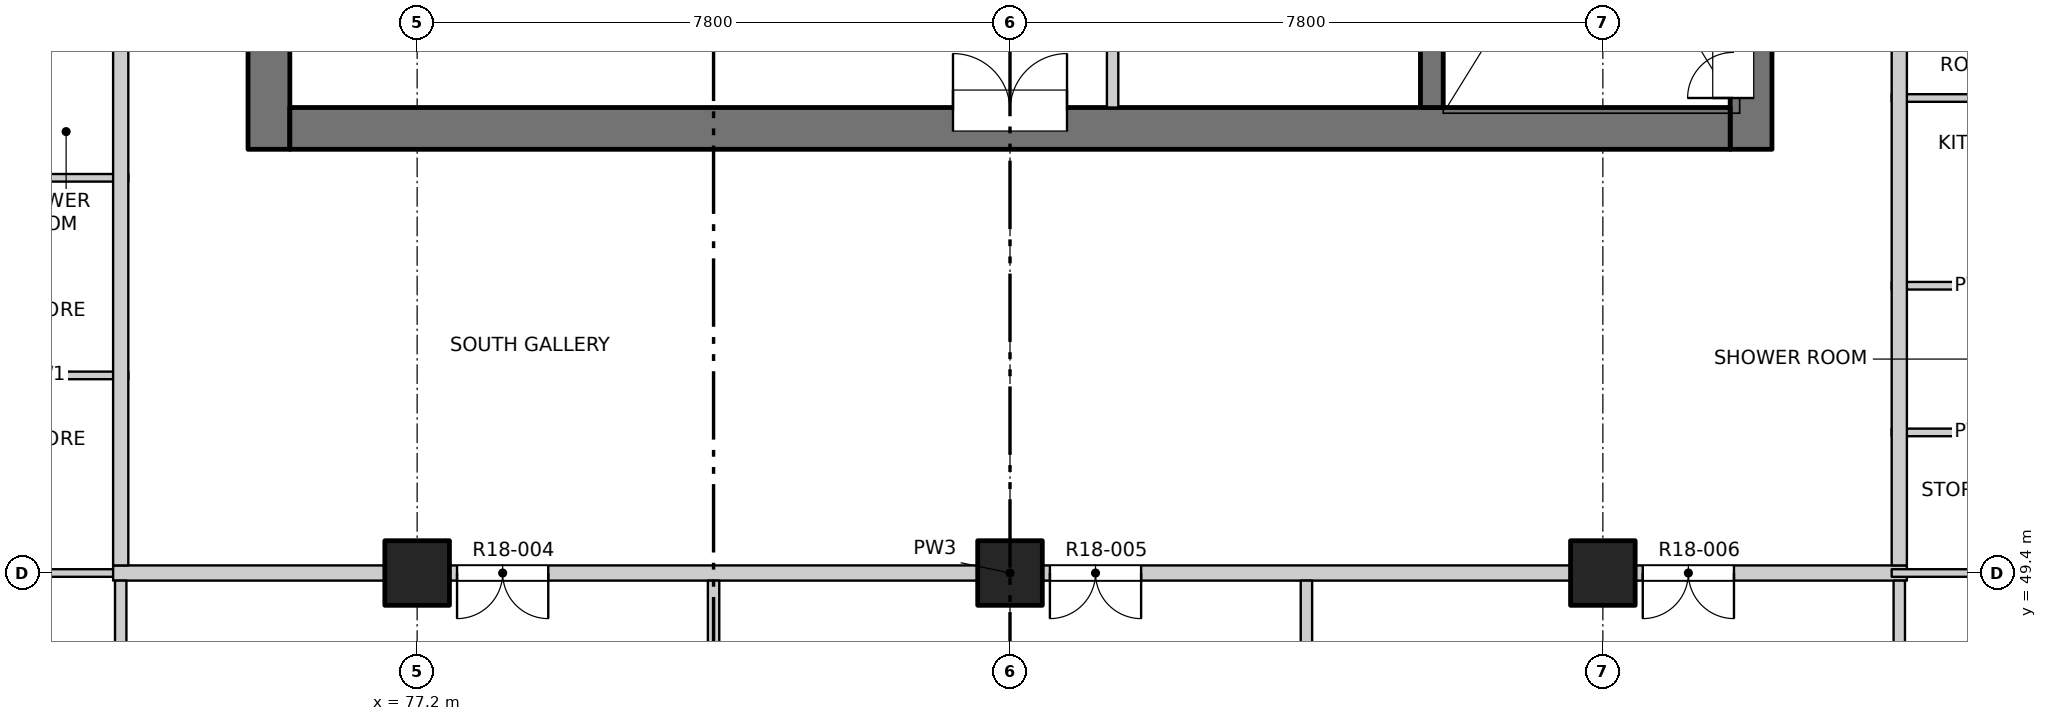
"""IFC4 building model, lengths in metres.
Left out: names, types, materials, properties, quantities, classifications, styles, units other than length and angle.
Written with IfcOpenShell. Run it as: python <this file> out.ifc"""

import sys

from ifc_helpers import new_model, si_unit, direction, frame, frame_2d, origin, origin_2d, place, context, subcontext, project, spatial, rectangle, extrude, element, fill, save


model = new_model("IFC4")
c1 = context("Model", 3, precision=1e-05, world=origin(), true_north=direction((0.0, 1.0)))
c2 = subcontext(c1, "Body", "Model", "MODEL_VIEW")
j1 = project(units=[si_unit("LENGTHUNIT", "METRE"), si_unit("PLANEANGLEUNIT", "RADIAN")], contexts=[c1])
p1 = place(None, origin())
s1 = spatial("IfcSite", under=j1, at=p1, CompositionType="ELEMENT")
p2 = place(p1, origin())
s2 = spatial("IfcBuilding", under=s1, at=p2, CompositionType="ELEMENT")
p3 = place(p2, frame((0.0, 0.0, 189.4)))
s3 = spatial("IfcBuildingStorey", under=s2, at=p3, CompositionType="ELEMENT", Elevation=189.4)
for number, where, z_axis, x_axis in (
    (1, (77.2, 49.4, -0.25), (0.0, 0.0, 1.0), (1.0, 0.0, 0.0)),
    (2, (85.0, 49.4, -0.25), (0.0, 0.0, 1.0), (1.0, 0.0, 0.0)),
    (3, (92.8, 49.4, -0.25), (0.0, 0.0, 1.0), (1.0, 0.0, 0.0)),
):
    element("IfcColumn", number, at=place(p3, frame(where, z_axis=z_axis, x_axis=x_axis)), inside=s3, PredefinedType="COLUMN", context=c2, shape_type="SweptSolid", body=[
        extrude(rectangle(XDim=0.85, YDim=0.85, at=origin_2d()), origin(), (0.0, 0.0, 1.0), 3.35),
    ])
p4 = place(p3, frame((75.25, 54.975, -0.25), z_axis=(0.0, 0.0, 1.0), x_axis=(0.0, 1.0, 0.0)))
e4 = element("IfcWall", 4, at=p4, inside=s3, PredefinedType="SOLIDWALL", context=c2, shape_type="SweptSolid", body=[
    extrude(rectangle(XDim=22.325, YDim=0.55, at=frame_2d((11.163, 0.0))), origin(), (0.0, 0.0, 1.0), 3.35),
])
p5 = place(p4, frame((7.475, 0.0, 0.25)))
e5 = element("IfcOpeningElement", 5, at=p5, cuts=e4, PredefinedType="OPENING", context=c2, shape_type="SweptSolid", body=[
    extrude(rectangle(XDim=0.9, YDim=2.1, at=frame_2d((0.45, 1.05))), frame((0.0, 0.285, 0.0), z_axis=(0.0, -1.0, 0.0), x_axis=(1.0, 0.0, 0.0)), (0.0, 0.0, 1.0), 0.57),
])
p6 = place(p4, frame((10.775, 0.0, 0.25)))
e6 = element("IfcOpeningElement", 6, at=p6, cuts=e4, PredefinedType="OPENING", context=c2, shape_type="SweptSolid", body=[
    extrude(rectangle(XDim=0.9, YDim=2.1, at=frame_2d((0.45, 1.05))), frame((0.0, 0.285, 0.0), z_axis=(0.0, -1.0, 0.0), x_axis=(1.0, 0.0, 0.0)), (0.0, 0.0, 1.0), 0.57),
])
p7 = place(p4, frame((13.775, 0.0, 0.25)))
e7 = element("IfcOpeningElement", 7, at=p7, cuts=e4, PredefinedType="OPENING", context=c2, shape_type="SweptSolid", body=[
    extrude(rectangle(XDim=0.9, YDim=2.1, at=frame_2d((0.45, 1.05))), frame((0.0, 0.285, 0.0), z_axis=(0.0, -1.0, 0.0), x_axis=(1.0, 0.0, 0.0)), (0.0, 0.0, 1.0), 0.57),
])
p8 = place(p4, frame((16.775, 0.0, 0.25)))
e8 = element("IfcOpeningElement", 8, at=p8, cuts=e4, PredefinedType="OPENING", context=c2, shape_type="SweptSolid", body=[
    extrude(rectangle(XDim=0.9, YDim=2.1, at=frame_2d((0.45, 1.05))), frame((0.0, 0.285, 0.0), z_axis=(0.0, -1.0, 0.0), x_axis=(1.0, 0.0, 0.0)), (0.0, 0.0, 1.0), 0.57),
])
p9 = place(p4, frame((20.075, 0.0, 0.25)))
e9 = element("IfcOpeningElement", 9, at=p9, cuts=e4, PredefinedType="OPENING", context=c2, shape_type="SweptSolid", body=[
    extrude(rectangle(XDim=0.9, YDim=2.1, at=frame_2d((0.45, 1.05))), frame((0.0, 0.285, 0.0), z_axis=(0.0, -1.0, 0.0), x_axis=(1.0, 0.0, 0.0)), (0.0, 0.0, 1.0), 0.57),
])
p10 = place(p3, frame((94.75, 54.975, -0.25), z_axis=(0.0, 0.0, 1.0), x_axis=(0.0, 1.0, 0.0)))
e10 = element("IfcWall", 10, at=p10, inside=s3, PredefinedType="SOLIDWALL", context=c2, shape_type="SweptSolid", body=[
    extrude(rectangle(XDim=6.975, YDim=0.55, at=frame_2d((3.487, 0.0))), origin(), (0.0, 0.0, 1.0), 3.35),
])
p11 = place(p10, frame((0.675, 0.0, 0.25)))
e11 = element("IfcOpeningElement", 11, at=p11, cuts=e10, PredefinedType="OPENING", context=c2, shape_type="SweptSolid", body=[
    extrude(rectangle(XDim=1.2, YDim=2.1, at=frame_2d((0.6, 1.05))), frame((0.0, 0.285, 0.0), z_axis=(0.0, -1.0, 0.0), x_axis=(1.0, 0.0, 0.0)), (0.0, 0.0, 1.0), 0.57),
])
p12 = place(p3, frame((75.525, 55.25, -0.25), z_axis=(0.0, 0.0, 1.0), x_axis=(1.0, 0.0, 0.0)))
e12 = element("IfcWall", 12, at=p12, inside=s3, PredefinedType="SOLIDWALL", context=c2, shape_type="SweptSolid", body=[
    extrude(rectangle(XDim=18.95, YDim=0.55, at=frame_2d((9.475, 0.0))), origin(), (0.0, 0.0, 1.0), 3.35),
])
p13 = place(p12, frame((8.725, 0.0, 0.25)))
e13 = element("IfcOpeningElement", 13, at=p13, cuts=e12, PredefinedType="OPENING", context=c2, shape_type="SweptSolid", body=[
    extrude(rectangle(XDim=1.5, YDim=2.1, at=frame_2d((0.75, 1.05))), frame((0.0, 0.285, 0.0), z_axis=(0.0, -1.0, 0.0), x_axis=(1.0, 0.0, 0.0)), (0.0, 0.0, 1.0), 0.57),
])
p14 = place(p3, frame((90.55, 55.525, -0.25), z_axis=(0.0, 0.0, 1.0), x_axis=(0.0, 1.0, 0.0)))
e14 = element("IfcWall", 14, at=p14, inside=s3, PredefinedType="SOLIDWALL", context=c2, shape_type="SweptSolid", body=[
    extrude(rectangle(XDim=6.425, YDim=0.3, at=frame_2d((3.212, 0.0))), origin(), (0.0, 0.0, 1.0), 3.35),
])
p15 = place(p3, frame((65.8, 49.4, 0.0), z_axis=(0.0, 0.0, 1.0), x_axis=(1.0, 0.0, 0.0)))
e15 = element("IfcWall", 15, at=p15, inside=s3, PredefinedType="PARTITIONING", context=c2, shape_type="SweptSolid", body=[
    extrude(rectangle(XDim=7.6, YDim=0.1, at=frame_2d((3.8, 0.0))), origin(), (0.0, 0.0, 1.0), 3.1),
])
p16 = place(p15, frame((4.14, 0.0, 0.0)))
e16 = element("IfcOpeningElement", 16, at=p16, cuts=e15, PredefinedType="OPENING", context=c2, shape_type="SweptSolid", body=[
    extrude(rectangle(XDim=0.9, YDim=2.1, at=frame_2d((0.45, 1.05))), frame((0.0, 0.06, 0.0), z_axis=(0.0, -1.0, 0.0), x_axis=(1.0, 0.0, 0.0)), (0.0, 0.0, 1.0), 0.12),
])
p17 = place(p3, frame((73.2, 49.4, 0.0), z_axis=(0.0, 0.0, 1.0), x_axis=(1.0, 0.0, 0.0)))
e17 = element("IfcWall", 17, at=p17, inside=s3, PredefinedType="PARTITIONING", context=c2, shape_type="SweptSolid", body=[
    extrude(rectangle(XDim=23.6, YDim=0.2, at=frame_2d((11.8, 0.0))), origin(), (0.0, 0.0, 1.0), 3.1),
])
p18 = place(p17, frame((4.525, 0.0, 0.0)))
e18 = element("IfcOpeningElement", 18, at=p18, cuts=e17, PredefinedType="OPENING", context=c2, shape_type="SweptSolid", body=[
    extrude(rectangle(XDim=1.2, YDim=2.1, at=frame_2d((0.6, 1.05))), frame((0.0, 0.11, 0.0), z_axis=(0.0, -1.0, 0.0), x_axis=(1.0, 0.0, 0.0)), (0.0, 0.0, 1.0), 0.22),
])
p19 = place(p17, frame((12.325, 0.0, 0.0)))
e19 = element("IfcOpeningElement", 19, at=p19, cuts=e17, PredefinedType="OPENING", context=c2, shape_type="SweptSolid", body=[
    extrude(rectangle(XDim=1.2, YDim=2.1, at=frame_2d((0.6, 1.05))), frame((0.0, 0.11, 0.0), z_axis=(0.0, -1.0, 0.0), x_axis=(1.0, 0.0, 0.0)), (0.0, 0.0, 1.0), 0.22),
])
p20 = place(p17, frame((20.125, 0.0, 0.0)))
e20 = element("IfcOpeningElement", 20, at=p20, cuts=e17, PredefinedType="OPENING", context=c2, shape_type="SweptSolid", body=[
    extrude(rectangle(XDim=1.2, YDim=2.1, at=frame_2d((0.6, 1.05))), frame((0.0, 0.11, 0.0), z_axis=(0.0, -1.0, 0.0), x_axis=(1.0, 0.0, 0.0)), (0.0, 0.0, 1.0), 0.22),
])
p21 = place(p3, frame((96.6, 49.4, 0.0), z_axis=(0.0, 0.0, 1.0), x_axis=(1.0, 0.0, 0.0)))
e21 = element("IfcWall", 21, at=p21, inside=s3, PredefinedType="PARTITIONING", context=c2, shape_type="SweptSolid", body=[
    extrude(rectangle(XDim=7.6, YDim=0.1, at=frame_2d((3.8, 0.0))), origin(), (0.0, 0.0, 1.0), 3.1),
])
p22 = place(p21, frame((2.56, 0.0, 0.0)))
e22 = element("IfcOpeningElement", 22, at=p22, cuts=e21, PredefinedType="OPENING", context=c2, shape_type="SweptSolid", body=[
    extrude(rectangle(XDim=0.9, YDim=2.1, at=frame_2d((0.45, 1.05))), frame((0.0, 0.06, 0.0), z_axis=(0.0, -1.0, 0.0), x_axis=(1.0, 0.0, 0.0)), (0.0, 0.0, 1.0), 0.12),
])
for number, where, z_axis, x_axis in (
    (23, (96.6, 51.25, 0.0), (0.0, 0.0, 1.0), (1.0, 0.0, 0.0)),
    (24, (71.18, 52.0, 0.0), (0.0, 0.0, 1.0), (1.0, 0.0, 0.0)),
    (25, (96.6, 53.18, 0.0), (0.0, 0.0, 1.0), (1.0, 0.0, 0.0)),
    (26, (71.18, 54.6, 0.0), (0.0, 0.0, 1.0), (1.0, 0.0, 0.0)),
    (27, (96.6, 55.65, 0.0), (0.0, 0.0, 1.0), (1.0, 0.0, 0.0)),
):
    element("IfcWall", number, at=place(p3, frame(where, z_axis=z_axis, x_axis=x_axis)), inside=s3, PredefinedType="PARTITIONING", context=c2, shape_type="SweptSolid", body=[
        extrude(rectangle(XDim=2.22, YDim=0.1, at=frame_2d((1.11, 0.0))), origin(), (0.0, 0.0, 1.0), 3.1),
    ])
p23 = place(p3, frame((73.3, 45.8, 0.0), z_axis=(0.0, 0.0, 1.0), x_axis=(0.0, 1.0, 0.0)))
e28 = element("IfcWall", 28, at=p23, inside=s3, PredefinedType="PARTITIONING", context=c2, shape_type="SweptSolid", body=[
    extrude(rectangle(XDim=3.5, YDim=0.15, at=frame_2d((1.75, 0.0))), origin(), (0.0, 0.0, 1.0), 3.1),
])
p24 = place(p3, frame((73.3, 49.5, 0.0), z_axis=(0.0, 0.0, 1.0), x_axis=(0.0, 1.0, 0.0)))
e29 = element("IfcWall", 29, at=p24, inside=s3, PredefinedType="PARTITIONING", context=c2, shape_type="SweptSolid", body=[
    extrude(rectangle(XDim=34.7, YDim=0.2, at=frame_2d((17.35, 0.0))), origin(), (0.0, 0.0, 1.0), 3.1),
])
p25 = place(p24, frame((13.825, 0.0, 0.0)))
e30 = element("IfcOpeningElement", 30, at=p25, cuts=e29, PredefinedType="OPENING", context=c2, shape_type="SweptSolid", body=[
    extrude(rectangle(XDim=1.0, YDim=2.1, at=frame_2d((0.5, 1.05))), frame((0.0, 0.11, 0.0), z_axis=(0.0, -1.0, 0.0), x_axis=(1.0, 0.0, 0.0)), (0.0, 0.0, 1.0), 0.22),
])
p26 = place(p24, frame((21.975, 0.0, 0.0)))
e31 = element("IfcOpeningElement", 31, at=p26, cuts=e29, PredefinedType="OPENING", context=c2, shape_type="SweptSolid", body=[
    extrude(rectangle(XDim=1.0, YDim=2.1, at=frame_2d((0.5, 1.05))), frame((0.0, 0.11, 0.0), z_axis=(0.0, -1.0, 0.0), x_axis=(1.0, 0.0, 0.0)), (0.0, 0.0, 1.0), 0.22),
])
p27 = place(p3, frame((81.1, 45.8, 0.0), z_axis=(0.0, 0.0, 1.0), x_axis=(0.0, 1.0, 0.0)))
e32 = element("IfcWall", 32, at=p27, inside=s3, PredefinedType="PARTITIONING", context=c2, shape_type="SweptSolid", body=[
    extrude(rectangle(XDim=3.5, YDim=0.15, at=frame_2d((1.75, 0.0))), origin(), (0.0, 0.0, 1.0), 3.1),
])
p28 = place(p3, frame((86.35, 55.525, 0.0), z_axis=(0.0, 0.0, 1.0), x_axis=(0.0, 1.0, 0.0)))
e33 = element("IfcWall", 33, at=p28, inside=s3, PredefinedType="PARTITIONING", context=c2, shape_type="SweptSolid", body=[
    extrude(rectangle(XDim=5.5, YDim=0.15, at=frame_2d((2.75, 0.0))), origin(), (0.0, 0.0, 1.0), 3.1),
])
p29 = place(p28, frame((2.175, 0.0, 0.0)))
e34 = element("IfcOpeningElement", 34, at=p29, cuts=e33, PredefinedType="OPENING", context=c2, shape_type="SweptSolid", body=[
    extrude(rectangle(XDim=0.9, YDim=2.1, at=frame_2d((0.45, 1.05))), frame((0.0, 0.085, 0.0), z_axis=(0.0, -1.0, 0.0), x_axis=(1.0, 0.0, 0.0)), (0.0, 0.0, 1.0), 0.17),
])
for number, where, z_axis, x_axis in (
    (35, (88.9, 45.8, 0.0), (0.0, 0.0, 1.0), (0.0, 1.0, 0.0)),
    (36, (96.7, 45.8, 0.0), (0.0, 0.0, 1.0), (0.0, 1.0, 0.0)),
):
    element("IfcWall", number, at=place(p3, frame(where, z_axis=z_axis, x_axis=x_axis)), inside=s3, PredefinedType="PARTITIONING", context=c2, shape_type="SweptSolid", body=[
        extrude(rectangle(XDim=3.5, YDim=0.15, at=frame_2d((1.75, 0.0))), origin(), (0.0, 0.0, 1.0), 3.1),
    ])
p30 = place(p3, frame((96.7, 49.5, 0.0), z_axis=(0.0, 0.0, 1.0), x_axis=(0.0, 1.0, 0.0)))
e37 = element("IfcWall", 37, at=p30, inside=s3, PredefinedType="PARTITIONING", context=c2, shape_type="SweptSolid", body=[
    extrude(rectangle(XDim=34.7, YDim=0.2, at=frame_2d((17.35, 0.0))), origin(), (0.0, 0.0, 1.0), 3.1),
])
p31 = place(p30, frame((7.425, 0.0, 0.0)))
e38 = element("IfcOpeningElement", 38, at=p31, cuts=e37, PredefinedType="OPENING", context=c2, shape_type="SweptSolid", body=[
    extrude(rectangle(XDim=1.0, YDim=2.1, at=frame_2d((0.5, 1.05))), frame((0.0, 0.11, 0.0), z_axis=(0.0, -1.0, 0.0), x_axis=(1.0, 0.0, 0.0)), (0.0, 0.0, 1.0), 0.22),
])
p32 = place(p30, frame((18.475, 0.0, 0.0)))
e39 = element("IfcOpeningElement", 39, at=p32, cuts=e37, PredefinedType="OPENING", context=c2, shape_type="SweptSolid", body=[
    extrude(rectangle(XDim=1.0, YDim=2.1, at=frame_2d((0.5, 1.05))), frame((0.0, 0.11, 0.0), z_axis=(0.0, -1.0, 0.0), x_axis=(1.0, 0.0, 0.0)), (0.0, 0.0, 1.0), 0.22),
])
p33 = place(p30, frame((29.025, 0.0, 0.0)))
e40 = element("IfcOpeningElement", 40, at=p33, cuts=e37, PredefinedType="OPENING", context=c2, shape_type="SweptSolid", body=[
    extrude(rectangle(XDim=1.0, YDim=2.1, at=frame_2d((0.5, 1.05))), frame((0.0, 0.11, 0.0), z_axis=(0.0, -1.0, 0.0), x_axis=(1.0, 0.0, 0.0)), (0.0, 0.0, 1.0), 0.22),
])
p34 = place(p18, origin())
e41 = element("IfcDoor", 41, at=p34, inside=s3, OperationType="DOUBLE_DOOR_SINGLE_SWING", PredefinedType="DOOR", context=c2, shape_type="SweptSolid", body=[
    extrude(rectangle(XDim=1.2, YDim=2.1, at=frame_2d((0.6, 1.05))), frame((0.0, 0.025, 0.0), z_axis=(0.0, -1.0, 0.0), x_axis=(1.0, 0.0, 0.0)), (0.0, 0.0, 1.0), 0.05),
])
fill(e18, e41)
p35 = place(p19, origin())
e42 = element("IfcDoor", 42, at=p35, inside=s3, OperationType="DOUBLE_DOOR_SINGLE_SWING", PredefinedType="DOOR", context=c2, shape_type="SweptSolid", body=[
    extrude(rectangle(XDim=1.2, YDim=2.1, at=frame_2d((0.6, 1.05))), frame((0.0, 0.025, 0.0), z_axis=(0.0, -1.0, 0.0), x_axis=(1.0, 0.0, 0.0)), (0.0, 0.0, 1.0), 0.05),
])
fill(e19, e42)
p36 = place(p20, origin())
e43 = element("IfcDoor", 43, at=p36, inside=s3, OperationType="DOUBLE_DOOR_SINGLE_SWING", PredefinedType="DOOR", context=c2, shape_type="SweptSolid", body=[
    extrude(rectangle(XDim=1.2, YDim=2.1, at=frame_2d((0.6, 1.05))), frame((0.0, 0.025, 0.0), z_axis=(0.0, -1.0, 0.0), x_axis=(1.0, 0.0, 0.0)), (0.0, 0.0, 1.0), 0.05),
])
fill(e20, e43)
p37 = place(p13, origin())
e44 = element("IfcDoor", 44, at=p37, inside=s3, OperationType="DOUBLE_DOOR_SINGLE_SWING", PredefinedType="DOOR", context=c2, shape_type="SweptSolid", body=[
    extrude(rectangle(XDim=1.5, YDim=2.1, at=frame_2d((0.75, 1.05))), frame((0.0, 0.26, 0.0), z_axis=(0.0, -1.0, 0.0), x_axis=(1.0, 0.0, 0.0)), (0.0, 0.0, 1.0), 0.05),
])
fill(e13, e44)
p38 = place(p11, origin())
e45 = element("IfcDoor", 45, at=p38, inside=s3, OperationType="DOUBLE_DOOR_SINGLE_SWING", PredefinedType="DOOR", context=c2, shape_type="SweptSolid", body=[
    extrude(rectangle(XDim=1.2, YDim=2.1, at=frame_2d((0.6, 1.05))), frame((0.0, 0.26, 0.0), z_axis=(0.0, -1.0, 0.0), x_axis=(1.0, 0.0, 0.0)), (0.0, 0.0, 1.0), 0.05),
])
fill(e11, e45)
save(model, sys.argv[1])
